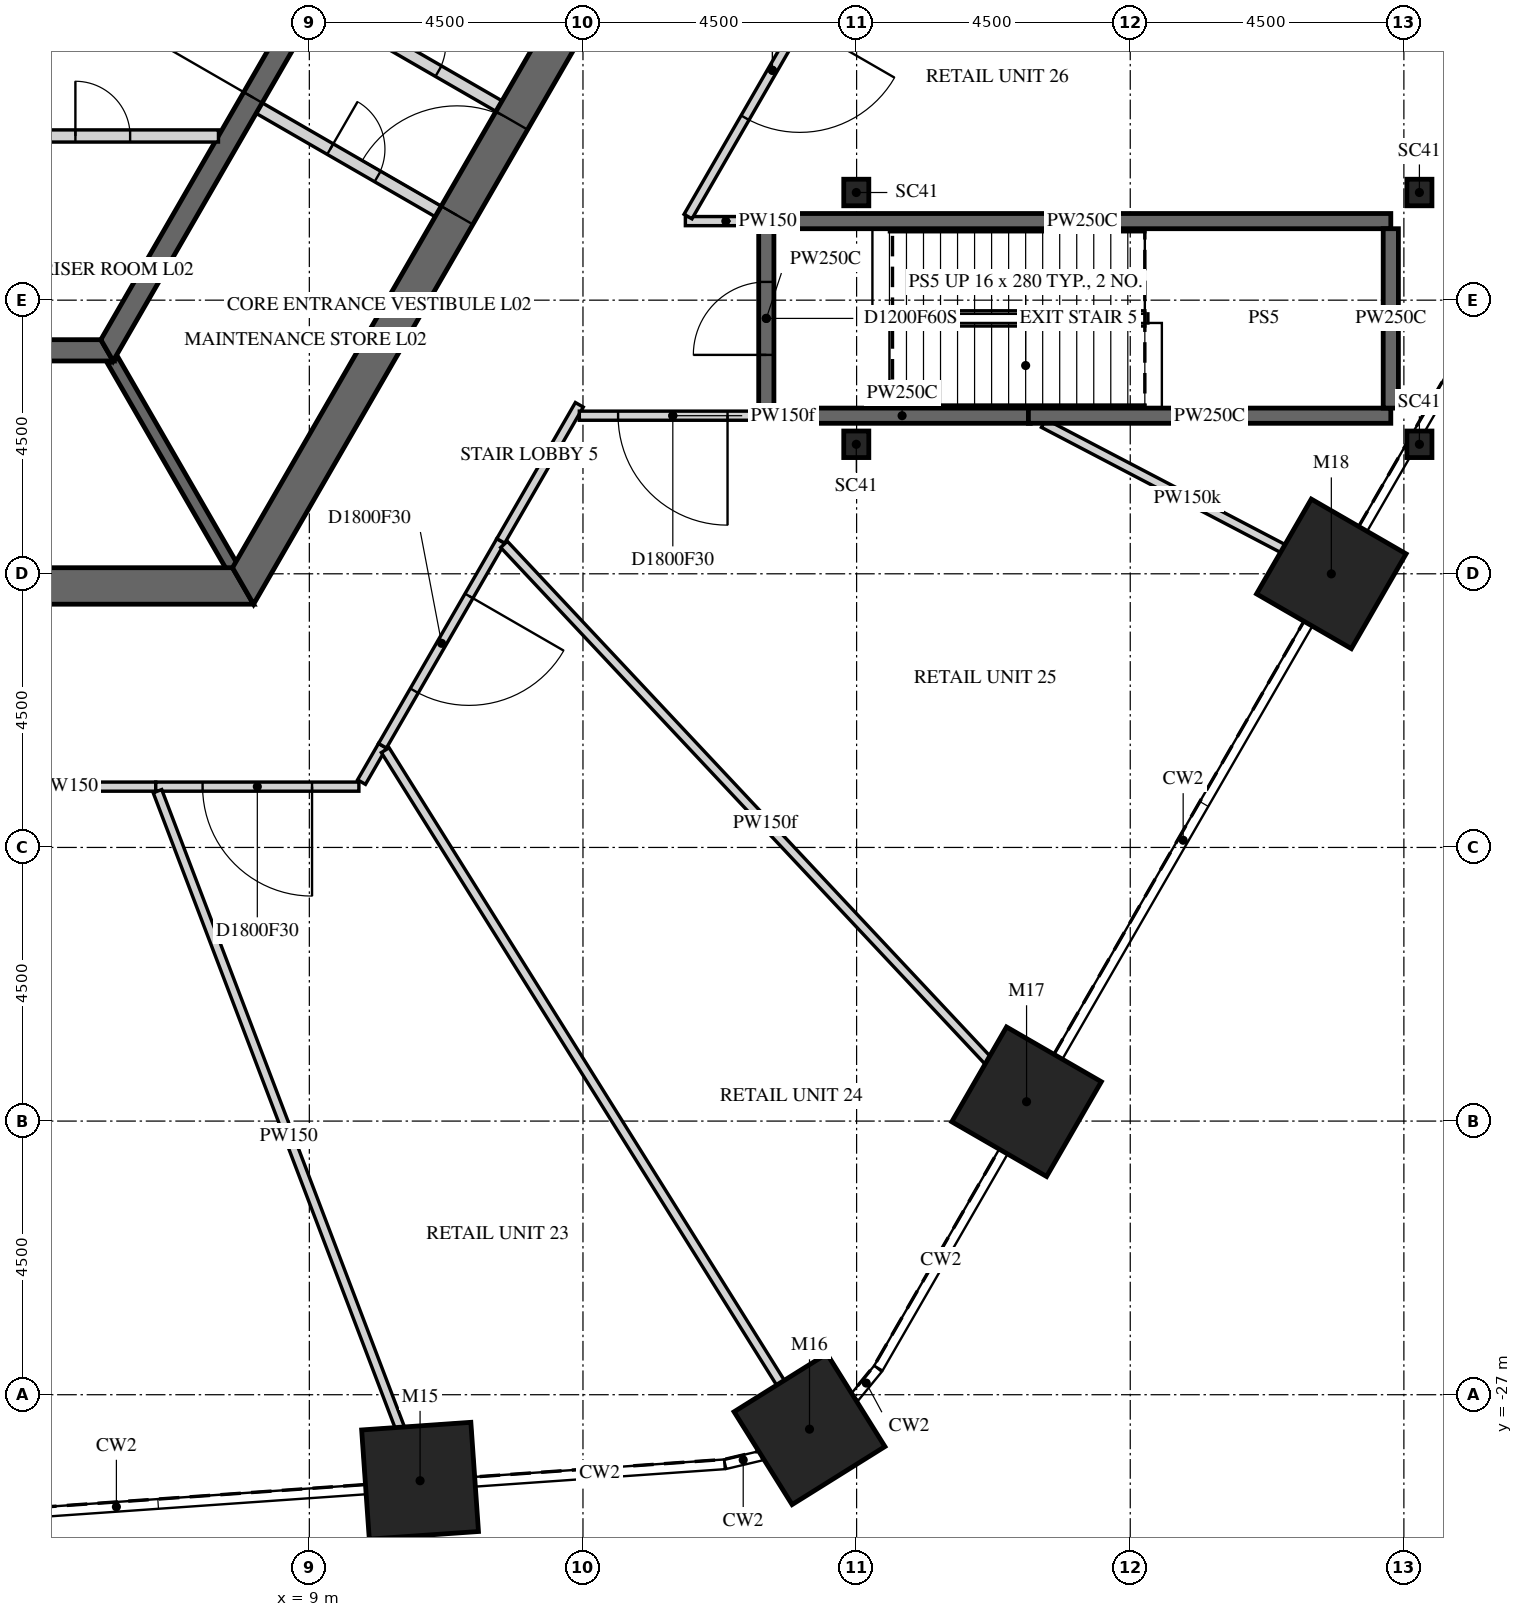
"""IFC4 building model, lengths in metres.
Left out: names, types, materials, properties, quantities, classifications, styles, units other than length and angle.
Written with IfcOpenShell. Run it as: python <this file> out.ifc"""

import sys

from ifc_helpers import new_model, si_unit, direction, frame, frame_2d, origin, origin_2d, place, context, subcontext, project, spatial, polyline, rectangle, i_section, outline, extrude, element, fill, save


model = new_model("IFC4")
c1 = context("Model", 3, precision=1e-05, world=origin(), true_north=direction((0.0, 1.0)))
c2 = subcontext(c1, "Body", "Model", "MODEL_VIEW")
j1 = project(units=[si_unit("LENGTHUNIT", "METRE"), si_unit("PLANEANGLEUNIT", "RADIAN")], contexts=[c1])
p1 = place(None, origin())
s1 = spatial("IfcSite", under=j1, at=p1, CompositionType="ELEMENT")
p2 = place(p1, origin())
s2 = spatial("IfcBuilding", under=s1, at=p2, CompositionType="ELEMENT")
p3 = place(p2, frame((0.0, 0.0, 15.0)))
s3 = spatial("IfcBuildingStorey", under=s2, at=p3, CompositionType="ELEMENT", Elevation=15.0)
for number, where, z_axis, x_axis in (
    (1, (10.821, -28.414, -0.25), (0.0, 0.0, 1.0), (-0.998, -0.07, 0.0)),
    (2, (17.225, -27.566, -0.25), (0.0, 0.0, 1.0), (-0.848, -0.53, 0.0)),
    (3, (20.795, -22.182, -0.25), (0.0, 0.0, 1.0), (-0.5, -0.866, 0.0)),
    (4, (25.807, -13.501, -0.25), (0.0, 0.0, 1.0), (-0.5, -0.866, 0.0)),
):
    element("IfcColumn", number, at=place(p3, frame(where, z_axis=z_axis, x_axis=x_axis)), inside=s3, PredefinedType="COLUMN", context=c2, shape_type="SweptSolid", body=[
        extrude(rectangle(XDim=1.8, YDim=1.8, at=origin_2d()), origin(), (0.0, 0.0, 1.0), 5.5),
    ])
for number, where, z_axis, x_axis in (
    (5, (27.255, -7.23, -0.25), (0.0, 0.0, 1.0), (1.0, 0.0, 0.0)),
    (6, (27.255, -11.37, -0.25), (0.0, 0.0, 1.0), (1.0, 0.0, 0.0)),
    (7, (17.995, -11.37, -0.25), (0.0, 0.0, 1.0), (1.0, 0.0, 0.0)),
    (8, (17.995, -7.23, -0.25), (0.0, 0.0, 1.0), (1.0, 0.0, 0.0)),
):
    element("IfcColumn", number, at=place(p3, frame(where, z_axis=z_axis, x_axis=x_axis)), inside=s3, PredefinedType="COLUMN", context=c2, shape_type="SweptSolid", body=[
        extrude(i_section(OverallWidth=0.412, OverallDepth=0.437, WebThickness=0.036, FlangeThickness=0.058, FilletRadius=0.015, at=origin_2d()), origin(), (0.0, 0.0, 1.0), 5.5),
    ])
p4 = place(p3, frame((-7.91, -13.7, -0.25), z_axis=(0.0, 0.0, 1.0), x_axis=(1.0, 0.0, 0.0)))
e9 = element("IfcWall", 9, at=p4, inside=s3, PredefinedType="SHEAR", context=c2, shape_type="SweptSolid", body=[
    extrude(outline(polyline([(-0.173, -0.3), (15.993, -0.3), (15.646, 0.3), (0.173, 0.3), (-0.173, -0.3)])), origin(), (0.0, 0.0, 1.0), 5.5),
])
p5 = place(p4, frame((7.31, 0.0, 0.25)))
e10 = element("IfcOpeningElement", 10, at=p5, cuts=e9, PredefinedType="OPENING", context=c2, shape_type="SweptSolid", body=[
    extrude(rectangle(XDim=1.2, YDim=2.4, at=frame_2d((0.6, 1.2))), frame((0.0, 0.31, 0.0), z_axis=(0.0, -1.0, 0.0), x_axis=(1.0, 0.0, 0.0)), (0.0, 0.0, 1.0), 0.62),
])
p6 = place(p3, frame((7.91, -13.7, -0.25), z_axis=(0.0, 0.0, 1.0), x_axis=(0.499999880136, 0.866025472988, 0.0)))
e11 = element("IfcWall", 11, at=p6, inside=s3, PredefinedType="SHEAR", context=c2, shape_type="SweptSolid", body=[
    extrude(outline(polyline([(-0.173, -0.3), (15.993, -0.3), (15.646, 0.3), (0.173, 0.3), (-0.173, -0.3)])), origin(), (0.0, 0.0, 1.0), 5.5),
])
p7 = place(p6, frame((7.039, 0.0, 0.25)))
e12 = element("IfcOpeningElement", 12, at=p7, cuts=e11, PredefinedType="OPENING", context=c2, shape_type="SweptSolid", body=[
    extrude(rectangle(XDim=1.8, YDim=2.4, at=frame_2d((0.9, 1.2))), frame((0.0, 0.31, 0.0), z_axis=(0.0, -1.0, 0.0), x_axis=(1.0, 0.0, 0.0)), (0.0, 0.0, 1.0), 0.62),
])
p8 = place(p3, frame((-5.673, -9.825, -0.25), z_axis=(0.0, 0.0, 1.0), x_axis=(1.0, 0.0, 0.0)))
e13 = element("IfcWall", 13, at=p8, inside=s3, PredefinedType="SHEAR", context=c2, shape_type="SweptSolid", body=[
    extrude(outline(polyline([(-0.101, -0.175), (11.446, -0.175), (11.244, 0.175), (0.101, 0.175), (-0.101, -0.175)])), origin(), (0.0, 0.0, 1.0), 5.5),
])
p9 = place(p3, frame((5.673, -9.825, -0.25), z_axis=(0.0, 0.0, 1.0), x_axis=(0.499995046907, 0.866028263435, 0.0)))
e14 = element("IfcWall", 14, at=p9, inside=s3, PredefinedType="SHEAR", context=c2, shape_type="SweptSolid", body=[
    extrude(outline(polyline([(-0.101, -0.175), (11.446, -0.175), (11.244, 0.175), (0.101, 0.175), (-0.101, -0.175)])), origin(), (0.0, 0.0, 1.0), 5.5),
])
p10 = place(p9, frame((4.801, 0.0, 0.25)))
e15 = element("IfcOpeningElement", 15, at=p10, cuts=e14, PredefinedType="OPENING", context=c2, shape_type="SweptSolid", body=[
    extrude(rectangle(XDim=1.8, YDim=2.4, at=frame_2d((0.9, 1.2))), frame((0.0, 0.185, 0.0), z_axis=(0.0, -1.0, 0.0), x_axis=(1.0, 0.0, 0.0)), (0.0, 0.0, 1.0), 0.37),
])
p11 = place(p3, frame((3.7, -6.3, 0.0), z_axis=(0.0, 0.0, 1.0), x_axis=(1.0, 0.0, 0.0)))
e16 = element("IfcWall", 16, at=p11, inside=s3, PredefinedType="PARTITIONING", context=c2, shape_type="SweptSolid", body=[
    extrude(rectangle(XDim=3.806, YDim=0.2, at=frame_2d((1.903, 0.0))), origin(), (0.0, 0.0, 1.0), 5.25),
])
p12 = place(p11, frame((1.453, 0.0, 0.0)))
e17 = element("IfcOpeningElement", 17, at=p12, cuts=e16, PredefinedType="OPENING", context=c2, shape_type="SweptSolid", body=[
    extrude(rectangle(XDim=0.9, YDim=2.1, at=frame_2d((0.45, 1.05))), frame((0.0, 0.11, 0.0), z_axis=(0.0, -1.0, 0.0), x_axis=(1.0, 0.0, 0.0)), (0.0, 0.0, 1.0), 0.22),
])
p13 = place(p3, frame((5.773, -10.0, -0.25), z_axis=(0.0, 0.0, 1.0), x_axis=(0.500038251005, -0.86600331843, 0.0)))
e18 = element("IfcWall", 18, at=p13, inside=s3, PredefinedType="SHEAR", context=c2, shape_type="SweptSolid", body=[
    extrude(rectangle(XDim=3.926, YDim=0.2, at=frame_2d((1.963, 0.0))), origin(), (0.0, 0.0, 1.0), 5.5),
])
p14 = place(p3, frame((9.175, -4.109, 0.0), z_axis=(0.0, 0.0, 1.0), x_axis=(0.865989465428, -0.500062241894, 0.0)))
e19 = element("IfcWall", 19, at=p14, inside=s3, PredefinedType="PARTITIONING", context=c2, shape_type="SweptSolid", body=[
    extrude(rectangle(XDim=3.4, YDim=0.2, at=frame_2d((1.7, 0.0))), origin(), (0.0, 0.0, 1.0), 5.25),
])
p15 = place(p14, frame((1.351, 0.0, 0.0)))
e20 = element("IfcOpeningElement", 20, at=p15, cuts=e19, PredefinedType="OPENING", context=c2, shape_type="SweptSolid", body=[
    extrude(rectangle(XDim=0.9, YDim=2.1, at=frame_2d((0.45, 1.05))), frame((0.0, 0.11, 0.0), z_axis=(0.0, -1.0, 0.0), x_axis=(1.0, 0.0, 0.0)), (0.0, 0.0, 1.0), 0.22),
])
p16 = place(p3, frame((8.175, -5.841, 0.0), z_axis=(0.0, 0.0, 1.0), x_axis=(0.866020560687, -0.500008388397, 0.0)))
e21 = element("IfcWall", 21, at=p16, inside=s3, PredefinedType="PARTITIONING", context=c2, shape_type="SweptSolid", body=[
    extrude(rectangle(XDim=3.4, YDim=0.2, at=frame_2d((1.7, 0.0))), origin(), (0.0, 0.0, 1.0), 5.25),
])
p17 = place(p16, frame((1.35, 0.0, 0.0)))
e22 = element("IfcOpeningElement", 22, at=p17, cuts=e21, PredefinedType="OPENING", context=c2, shape_type="SweptSolid", body=[
    extrude(rectangle(XDim=0.9, YDim=2.1, at=frame_2d((0.45, 1.05))), frame((0.0, 0.11, 0.0), z_axis=(0.0, -1.0, 0.0), x_axis=(1.0, 0.0, 0.0)), (0.0, 0.0, 1.0), 0.22),
])
p18 = place(p3, frame((6.474, -17.0, 0.0), z_axis=(0.0, 0.0, 1.0), x_axis=(-1.0, 0.0, 0.0)))
e23 = element("IfcWall", 23, at=p18, inside=s3, PredefinedType="PARTITIONING", context=c2, shape_type="SweptSolid", body=[
    extrude(rectangle(XDim=6.474, YDim=0.15, at=frame_2d((3.237, 0.0))), origin(), (0.0, 0.0, 1.0), 5.25),
])
p19 = place(p18, frame((2.337, 0.0, 0.0)))
e24 = element("IfcOpeningElement", 24, at=p19, cuts=e23, PredefinedType="OPENING", context=c2, shape_type="SweptSolid", body=[
    extrude(rectangle(XDim=1.8, YDim=2.1, at=frame_2d((0.9, 1.05))), frame((0.0, 0.085, 0.0), z_axis=(0.0, -1.0, 0.0), x_axis=(1.0, 0.0, 0.0)), (0.0, 0.0, 1.0), 0.17),
])
p20 = place(p3, frame((9.815, -17.0, 0.0), z_axis=(0.0, 0.0, 1.0), x_axis=(-1.0, 0.0, 0.0)))
e25 = element("IfcWall", 25, at=p20, inside=s3, PredefinedType="PARTITIONING", context=c2, shape_type="SweptSolid", body=[
    extrude(rectangle(XDim=3.341, YDim=0.15, at=frame_2d((1.67, 0.0))), origin(), (0.0, 0.0, 1.0), 5.25),
])
p21 = place(p20, frame((0.771, 0.0, 0.0)))
e26 = element("IfcOpeningElement", 26, at=p21, cuts=e25, PredefinedType="OPENING", context=c2, shape_type="SweptSolid", body=[
    extrude(rectangle(XDim=1.8, YDim=2.1, at=frame_2d((0.9, 1.05))), frame((0.0, 0.085, 0.0), z_axis=(0.0, -1.0, 0.0), x_axis=(1.0, 0.0, 0.0)), (0.0, 0.0, 1.0), 0.17),
])
p22 = place(p3, frame((9.858, -16.925, 0.0), z_axis=(0.0, 0.0, 1.0), x_axis=(0.499681576323, 0.866209167744, 0.0)))
e27 = element("IfcWall", 27, at=p22, inside=s3, PredefinedType="PARTITIONING", context=c2, shape_type="SweptSolid", body=[
    extrude(rectangle(XDim=0.689, YDim=0.15, at=frame_2d((0.345, 0.0))), origin(), (0.0, 0.0, 1.0), 5.25),
])
p23 = place(p3, frame((12.148, -12.959, 0.0), z_axis=(0.0, 0.0, 1.0), x_axis=(-0.500006760876, -0.866021500355, 0.0)))
e28 = element("IfcWall", 28, at=p23, inside=s3, PredefinedType="PARTITIONING", context=c2, shape_type="SweptSolid", body=[
    extrude(rectangle(XDim=3.89, YDim=0.15, at=frame_2d((1.945, 0.0))), origin(), (0.0, 0.0, 1.0), 5.25),
])
p24 = place(p23, frame((1.045, 0.0, 0.0)))
e29 = element("IfcOpeningElement", 29, at=p24, cuts=e28, PredefinedType="OPENING", context=c2, shape_type="SweptSolid", body=[
    extrude(rectangle(XDim=1.8, YDim=2.1, at=frame_2d((0.9, 1.05))), frame((0.0, 0.085, 0.0), z_axis=(0.0, -1.0, 0.0), x_axis=(1.0, 0.0, 0.0)), (0.0, 0.0, 1.0), 0.17),
])
p25 = place(p3, frame((10.821, -28.414, 0.0), z_axis=(0.0, 0.0, 1.0), x_axis=(-0.355901613379, 0.934523430201, 0.0)))
e30 = element("IfcWall", 30, at=p25, inside=s3, PredefinedType="PARTITIONING", context=c2, shape_type="SweptSolid", body=[
    extrude(rectangle(XDim=12.134, YDim=0.15, at=frame_2d((6.067, 0.0))), origin(), (0.0, 0.0, 1.0), 5.25),
])
p26 = place(p3, frame((12.148, -12.959, 0.0), z_axis=(0.0, 0.0, 1.0), x_axis=(0.499959617396, 0.866048717436, 0.0)))
e31 = element("IfcWall", 31, at=p26, inside=s3, PredefinedType="PARTITIONING", context=c2, shape_type="SweptSolid", body=[
    extrude(rectangle(XDim=2.584, YDim=0.15, at=frame_2d((1.292, 0.0))), origin(), (0.0, 0.0, 1.0), 5.25),
])
p27 = place(p3, frame((15.184, -7.7, 0.0), z_axis=(0.0, 0.0, 1.0), x_axis=(1.0, 0.0, 0.0)))
e32 = element("IfcWall", 32, at=p27, inside=s3, PredefinedType="PARTITIONING", context=c2, shape_type="SweptSolid", body=[
    extrude(rectangle(XDim=1.331, YDim=0.15, at=frame_2d((0.666, 0.0))), origin(), (0.0, 0.0, 1.0), 5.25),
])
p28 = place(p3, frame((18.004, -2.816, 0.0), z_axis=(0.0, 0.0, 1.0), x_axis=(-0.500011685716, -0.866018656928, 0.0)))
e33 = element("IfcWall", 33, at=p28, inside=s3, PredefinedType="PARTITIONING", context=c2, shape_type="SweptSolid", body=[
    extrude(rectangle(XDim=5.553, YDim=0.15, at=frame_2d((2.776, 0.0))), origin(), (0.0, 0.0, 1.0), 5.25),
])
p29 = place(p28, frame((1.876, 0.0, 0.0)))
e34 = element("IfcOpeningElement", 34, at=p29, cuts=e33, PredefinedType="OPENING", context=c2, shape_type="SweptSolid", body=[
    extrude(rectangle(XDim=1.8, YDim=2.1, at=frame_2d((0.9, 1.05))), frame((0.0, 0.085, 0.0), z_axis=(0.0, -1.0, 0.0), x_axis=(1.0, 0.0, 0.0)), (0.0, 0.0, 1.0), 0.17),
])
p30 = place(p3, frame((16.515, -10.9, 0.0), z_axis=(0.0, 0.0, 1.0), x_axis=(-1.0, 0.0, 0.0)))
e35 = element("IfcWall", 35, at=p30, inside=s3, PredefinedType="PARTITIONING", context=c2, shape_type="SweptSolid", body=[
    extrude(rectangle(XDim=3.075, YDim=0.15, at=frame_2d((1.538, 0.0))), origin(), (0.0, 0.0, 1.0), 4.496),
])
p31 = place(p30, frame((0.637, 0.0, 0.0)))
e36 = element("IfcOpeningElement", 36, at=p31, cuts=e35, PredefinedType="OPENING", context=c2, shape_type="SweptSolid", body=[
    extrude(rectangle(XDim=1.8, YDim=2.1, at=frame_2d((0.9, 1.05))), frame((0.0, 0.085, 0.0), z_axis=(0.0, -1.0, 0.0), x_axis=(1.0, 0.0, 0.0)), (0.0, 0.0, 1.0), 0.17),
])
p32 = place(p3, frame((16.515, -10.825, 0.0), z_axis=(0.0, 0.0, 1.0), x_axis=(0.0, 1.0, 0.0)))
e37 = element("IfcWall", 37, at=p32, inside=s3, PredefinedType="PARTITIONING", context=c2, shape_type="SweptSolid", body=[
    extrude(rectangle(XDim=3.05, YDim=0.25, at=frame_2d((1.525, 0.0))), origin(), (0.0, 0.0, 1.0), 5.25),
])
p33 = place(p32, frame((0.925, 0.0, 0.0)))
e38 = element("IfcOpeningElement", 38, at=p33, cuts=e37, PredefinedType="OPENING", context=c2, shape_type="SweptSolid", body=[
    extrude(rectangle(XDim=1.2, YDim=2.1, at=frame_2d((0.6, 1.05))), frame((0.0, 0.135, 0.0), z_axis=(0.0, -1.0, 0.0), x_axis=(1.0, 0.0, 0.0)), (0.0, 0.0, 1.0), 0.27),
])
p34 = place(p3, frame((16.64, -7.7, 0.0), z_axis=(0.0, 0.0, 1.0), x_axis=(1.0, 0.0, 0.0)))
e39 = element("IfcWall", 39, at=p34, inside=s3, PredefinedType="PARTITIONING", context=c2, shape_type="SweptSolid", body=[
    extrude(rectangle(XDim=10.145, YDim=0.25, at=frame_2d((5.073, 0.0))), origin(), (0.0, 0.0, 1.0), 5.25),
])
p35 = place(p3, frame((17.225, -27.566, 0.0), z_axis=(0.0, 0.0, 1.0), x_axis=(-0.529913932499, 0.848051427771, 0.0)))
e40 = element("IfcWall", 40, at=p35, inside=s3, PredefinedType="PARTITIONING", context=c2, shape_type="SweptSolid", body=[
    extrude(rectangle(XDim=13.167, YDim=0.15, at=frame_2d((6.583, 0.0))), origin(), (0.0, 0.0, 1.0), 4.488),
])
p36 = place(p3, frame((20.795, -22.182, 0.0), z_axis=(0.0, 0.0, 1.0), x_axis=(-0.683955995382, 0.729523266511, 0.0)))
e41 = element("IfcWall", 41, at=p36, inside=s3, PredefinedType="PARTITIONING", context=c2, shape_type="SweptSolid", body=[
    extrude(rectangle(XDim=12.564, YDim=0.15, at=frame_2d((6.282, 0.0))), origin(), (0.0, 0.0, 1.0), 4.496),
])
p37 = place(p3, frame((20.856, -10.9, 0.0), z_axis=(0.0, 0.0, 1.0), x_axis=(-1.0, 0.0, 0.0)))
e42 = element("IfcWall", 42, at=p37, inside=s3, PredefinedType="PARTITIONING", context=c2, shape_type="SweptSolid", body=[
    extrude(rectangle(XDim=4.216, YDim=0.25, at=frame_2d((2.108, 0.0))), origin(), (0.0, 0.0, 1.0), 5.25),
])
p38 = place(p3, frame((25.807, -13.501, 0.0), z_axis=(0.0, 0.0, 1.0), x_axis=(-0.886067598261, 0.463556049807, 0.0)))
e43 = element("IfcWall", 43, at=p38, inside=s3, PredefinedType="PARTITIONING", context=c2, shape_type="SweptSolid", body=[
    extrude(rectangle(XDim=5.342, YDim=0.15, at=frame_2d((2.671, 0.0))), origin(), (0.0, 0.0, 1.0), 4.323),
])
p39 = place(p3, frame((26.785, -10.9, 0.0), z_axis=(0.0, 0.0, 1.0), x_axis=(-1.0, 0.0, 0.0)))
e44 = element("IfcWall", 44, at=p39, inside=s3, PredefinedType="PARTITIONING", context=c2, shape_type="SweptSolid", body=[
    extrude(rectangle(XDim=5.96, YDim=0.25, at=frame_2d((2.98, 0.0))), origin(), (0.0, 0.0, 1.0), 5.25),
])
p40 = place(p3, frame((26.785, -7.825, 0.0), z_axis=(0.0, 0.0, 1.0), x_axis=(0.0, -1.0, 0.0)))
e45 = element("IfcWall", 45, at=p40, inside=s3, PredefinedType="PARTITIONING", context=c2, shape_type="SweptSolid", body=[
    extrude(rectangle(XDim=2.95, YDim=0.25, at=frame_2d((1.475, 0.0))), origin(), (0.0, 0.0, 1.0), 5.25),
])
p41 = place(p7, origin())
e46 = element("IfcDoor", 46, at=p41, inside=s3, OperationType="DOUBLE_DOOR_SINGLE_SWING", PredefinedType="DOOR", context=c2, shape_type="SweptSolid", body=[
    extrude(rectangle(XDim=1.8, YDim=2.4, at=frame_2d((0.9, 1.2))), frame((0.0, 0.025, 0.0), z_axis=(0.0, -1.0, 0.0), x_axis=(1.0, 0.0, 0.0)), (0.0, 0.0, 1.0), 0.05),
])
fill(e12, e46)
p42 = place(p10, origin())
e47 = element("IfcDoor", 47, at=p42, inside=s3, OperationType="DOUBLE_DOOR_SINGLE_SWING", PredefinedType="DOOR", context=c2, shape_type="SweptSolid", body=[
    extrude(rectangle(XDim=1.8, YDim=2.4, at=frame_2d((0.9, 1.2))), frame((0.0, 0.025, 0.0), z_axis=(0.0, -1.0, 0.0), x_axis=(1.0, 0.0, 0.0)), (0.0, 0.0, 1.0), 0.05),
])
fill(e15, e47)
p43 = place(p12, origin())
e48 = element("IfcDoor", 48, at=p43, inside=s3, OperationType="SINGLE_SWING_LEFT", PredefinedType="DOOR", context=c2, shape_type="SweptSolid", body=[
    extrude(rectangle(XDim=0.9, YDim=2.1, at=frame_2d((0.45, 1.05))), frame((0.0, 0.025, 0.0), z_axis=(0.0, -1.0, 0.0), x_axis=(1.0, 0.0, 0.0)), (0.0, 0.0, 1.0), 0.05),
])
fill(e17, e48)
p44 = place(p15, origin())
e49 = element("IfcDoor", 49, at=p44, inside=s3, OperationType="SINGLE_SWING_LEFT", PredefinedType="DOOR", context=c2, shape_type="SweptSolid", body=[
    extrude(rectangle(XDim=0.9, YDim=2.1, at=frame_2d((0.45, 1.05))), frame((0.0, 0.025, 0.0), z_axis=(0.0, -1.0, 0.0), x_axis=(1.0, 0.0, 0.0)), (0.0, 0.0, 1.0), 0.05),
])
fill(e20, e49)
p45 = place(p17, origin())
e50 = element("IfcDoor", 50, at=p45, inside=s3, OperationType="SINGLE_SWING_LEFT", PredefinedType="DOOR", context=c2, shape_type="SweptSolid", body=[
    extrude(rectangle(XDim=0.9, YDim=2.1, at=frame_2d((0.45, 1.05))), frame((0.0, 0.025, 0.0), z_axis=(0.0, -1.0, 0.0), x_axis=(1.0, 0.0, 0.0)), (0.0, 0.0, 1.0), 0.05),
])
fill(e22, e50)
p46 = place(p21, origin())
e51 = element("IfcDoor", 51, at=p46, inside=s3, OperationType="DOUBLE_DOOR_SINGLE_SWING", PredefinedType="DOOR", context=c2, shape_type="SweptSolid", body=[
    extrude(rectangle(XDim=1.8, YDim=2.1, at=frame_2d((0.9, 1.05))), frame((0.0, 0.025, 0.0), z_axis=(0.0, -1.0, 0.0), x_axis=(1.0, 0.0, 0.0)), (0.0, 0.0, 1.0), 0.05),
])
fill(e26, e51)
p47 = place(p24, origin())
e52 = element("IfcDoor", 52, at=p47, inside=s3, OperationType="DOUBLE_DOOR_SINGLE_SWING", PredefinedType="DOOR", context=c2, shape_type="SweptSolid", body=[
    extrude(rectangle(XDim=1.8, YDim=2.1, at=frame_2d((0.9, 1.05))), frame((0.0, 0.025, 0.0), z_axis=(0.0, -1.0, 0.0), x_axis=(1.0, 0.0, 0.0)), (0.0, 0.0, 1.0), 0.05),
])
fill(e29, e52)
p48 = place(p29, origin())
e53 = element("IfcDoor", 53, at=p48, inside=s3, OperationType="DOUBLE_DOOR_SINGLE_SWING", PredefinedType="DOOR", context=c2, shape_type="SweptSolid", body=[
    extrude(rectangle(XDim=1.8, YDim=2.1, at=frame_2d((0.9, 1.05))), frame((0.0, 0.025, 0.0), z_axis=(0.0, -1.0, 0.0), x_axis=(1.0, 0.0, 0.0)), (0.0, 0.0, 1.0), 0.05),
])
fill(e34, e53)
p49 = place(p31, origin())
e54 = element("IfcDoor", 54, at=p49, inside=s3, OperationType="DOUBLE_DOOR_SINGLE_SWING", PredefinedType="DOOR", context=c2, shape_type="SweptSolid", body=[
    extrude(rectangle(XDim=1.8, YDim=2.1, at=frame_2d((0.9, 1.05))), frame((0.0, 0.025, 0.0), z_axis=(0.0, -1.0, 0.0), x_axis=(1.0, 0.0, 0.0)), (0.0, 0.0, 1.0), 0.05),
])
fill(e36, e54)
p50 = place(p33, origin())
e55 = element("IfcDoor", 55, at=p50, inside=s3, OperationType="SINGLE_SWING_RIGHT", PredefinedType="DOOR", context=c2, shape_type="SweptSolid", body=[
    extrude(rectangle(XDim=1.2, YDim=2.1, at=frame_2d((0.6, 1.05))), frame((0.0, 0.025, 0.0), z_axis=(0.0, -1.0, 0.0), x_axis=(1.0, 0.0, 0.0)), (0.0, 0.0, 1.0), 0.05),
])
fill(e38, e55)
save(model, sys.argv[1])
